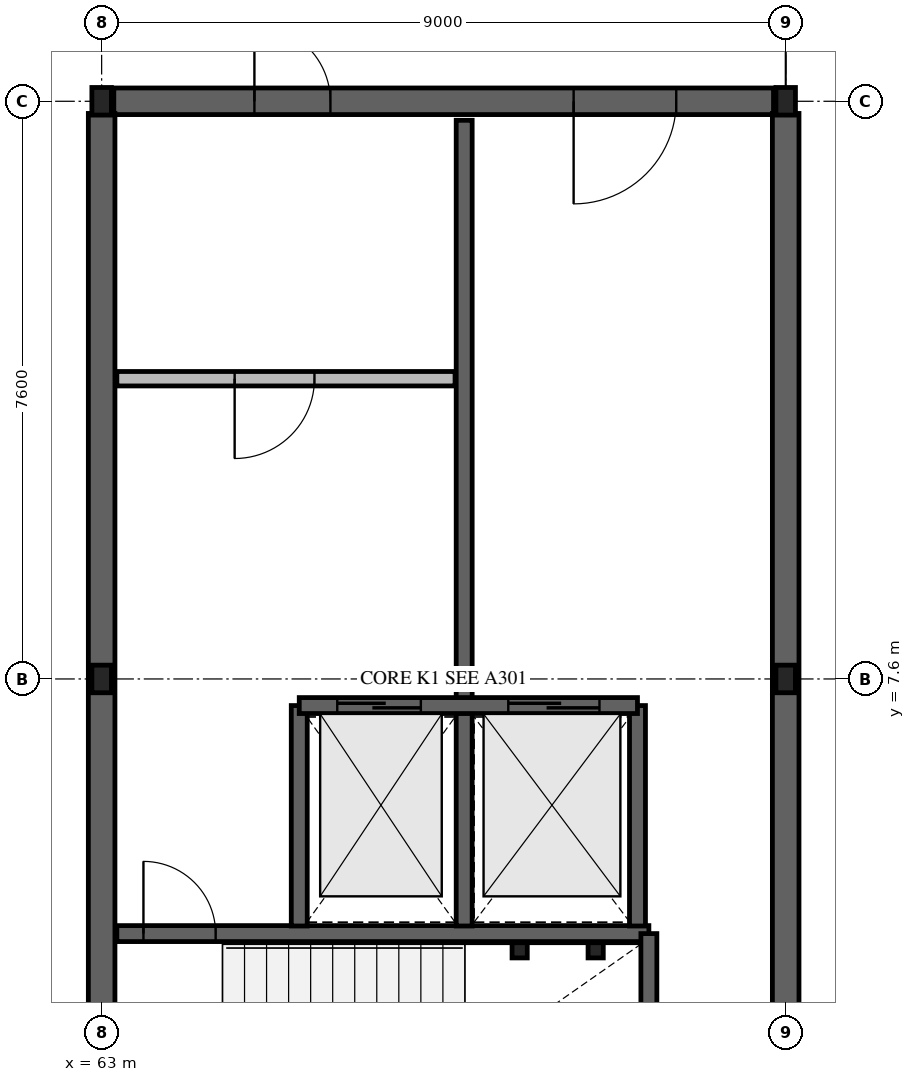
"""IFC4 building model, lengths in metres.
Left out: names, types, materials, properties, quantities, classifications, styles, units other than length and angle.
Written with IfcOpenShell. Run it as: python <this file> out.ifc"""

import sys

from ifc_helpers import new_model, si_unit, direction, frame, frame_2d, origin, origin_2d, place, context, subcontext, project, spatial, rectangle, hollow_rectangle, i_section, extrude, element, fill, save


model = new_model("IFC4")
c1 = context("Model", 3, precision=1e-05, world=origin(), true_north=direction((0.0, 1.0)))
c2 = subcontext(c1, "Body", "Model", "MODEL_VIEW")
j1 = project(units=[si_unit("LENGTHUNIT", "METRE"), si_unit("PLANEANGLEUNIT", "RADIAN")], contexts=[c1])
p1 = place(None, origin())
s1 = spatial("IfcSite", under=j1, at=p1, CompositionType="ELEMENT")
p2 = place(p1, origin())
s2 = spatial("IfcBuilding", under=s1, at=p2, CompositionType="ELEMENT")
p3 = place(p2, frame((0.0, 0.0, 13.68)))
s3 = spatial("IfcBuildingStorey", under=s2, at=p3, CompositionType="ELEMENT", Elevation=13.68)
for number, where, z_axis, x_axis in (
    (1, (63.0, 7.6, 0.0), (0.0, 0.0, 1.0), (1.0, 0.0, 0.0)),
    (2, (63.0, 15.2, 0.0), (0.0, 0.0, 1.0), (1.0, 0.0, 0.0)),
    (3, (72.0, 7.6, 0.0), (0.0, 0.0, 1.0), (1.0, 0.0, 0.0)),
    (4, (72.0, 15.2, 0.0), (0.0, 0.0, 1.0), (1.0, 0.0, 0.0)),
):
    element("IfcColumn", number, at=place(p3, frame(where, z_axis=z_axis, x_axis=x_axis)), inside=s3, PredefinedType="COLUMN", context=c2, shape_type="SweptSolid", body=[
        extrude(i_section(OverallWidth=0.257, OverallDepth=0.363, WebThickness=0.013, FlangeThickness=0.022, FilletRadius=0.015, at=origin_2d()), origin(), (0.0, 0.0, 1.0), 4.32),
    ])
p4 = place(p3, frame((63.16, 15.2, 0.0), z_axis=(0.0, 0.0, 1.0), x_axis=(1.0, 0.0, 0.0)))
e5 = element("IfcWall", 5, at=p4, inside=s3, PredefinedType="SHEAR", context=c2, shape_type="SweptSolid", body=[
    extrude(rectangle(XDim=8.68, YDim=0.35, at=frame_2d((4.34, 0.0))), origin(), (0.0, 0.0, 1.0), 4.04),
])
p5 = place(p4, frame((1.85, 0.0, 0.0)))
e6 = element("IfcOpeningElement", 6, at=p5, cuts=e5, PredefinedType="OPENING", context=c2, shape_type="SweptSolid", body=[
    extrude(rectangle(XDim=1.0, YDim=2.15, at=frame_2d((0.5, 1.075))), frame((0.0, 0.185, 0.0), z_axis=(0.0, -1.0, 0.0), x_axis=(1.0, 0.0, 0.0)), (0.0, 0.0, 1.0), 0.37),
])
p6 = place(p4, frame((6.05, 0.0, 0.0)))
e7 = element("IfcOpeningElement", 7, at=p6, cuts=e5, PredefinedType="OPENING", context=c2, shape_type="SweptSolid", body=[
    extrude(rectangle(XDim=1.35, YDim=2.18, at=frame_2d((0.675, 1.09))), frame((0.0, 0.185, 0.0), z_axis=(0.0, -1.0, 0.0), x_axis=(1.0, 0.0, 0.0)), (0.0, 0.0, 1.0), 0.37),
])
for number, where, z_axis, x_axis in (
    (8, (63.0, 0.16, 0.0), (0.0, 0.0, 1.0), (0.0, 1.0, 0.0)),
    (9, (72.0, 0.16, 0.0), (0.0, 0.0, 1.0), (0.0, 1.0, 0.0)),
):
    element("IfcWall", number, at=place(p3, frame(where, z_axis=z_axis, x_axis=x_axis)), inside=s3, PredefinedType="SHEAR", context=c2, shape_type="SweptSolid", body=[
        extrude(rectangle(XDim=14.88, YDim=0.35, at=frame_2d((7.44, 0.0))), origin(), (0.0, 0.0, 1.0), 4.04),
    ])
p7 = place(p3, frame((63.2, 4.25, 0.0), z_axis=(0.0, 0.0, 1.0), x_axis=(1.0, 0.0, 0.0)))
e10 = element("IfcWall", 10, at=p7, inside=s3, PredefinedType="SOLIDWALL", context=c2, shape_type="SweptSolid", body=[
    extrude(rectangle(XDim=7.0, YDim=0.21, at=frame_2d((3.5, 0.0))), origin(), (0.0, 0.0, 1.0), 4.04),
])
p8 = place(p7, frame((0.35, 0.0, 0.0)))
e11 = element("IfcOpeningElement", 11, at=p8, cuts=e10, PredefinedType="OPENING", context=c2, shape_type="SweptSolid", body=[
    extrude(rectangle(XDim=0.95, YDim=2.12, at=frame_2d((0.475, 1.06))), frame((0.0, 0.115, 0.0), z_axis=(0.0, -1.0, 0.0), x_axis=(1.0, 0.0, 0.0)), (0.0, 0.0, 1.0), 0.23),
])
p9 = place(p3, frame((70.2, 0.2, 0.0), z_axis=(0.0, 0.0, 1.0), x_axis=(0.0, 1.0, 0.0)))
e12 = element("IfcWall", 12, at=p9, inside=s3, PredefinedType="SOLIDWALL", context=c2, shape_type="SweptSolid", body=[
    extrude(rectangle(XDim=4.05, YDim=0.21, at=frame_2d((2.025, 0.0))), origin(), (0.0, 0.0, 1.0), 4.04),
])
p10 = place(p3, frame((65.6, 4.35, 0.0), z_axis=(0.0, 0.0, 1.0), x_axis=(0.0, 1.0, 0.0)))
e13 = element("IfcWall", 13, at=p10, inside=s3, PredefinedType="SOLIDWALL", context=c2, shape_type="SweptSolid", body=[
    extrude(rectangle(XDim=2.9, YDim=0.21, at=frame_2d((1.45, 0.0))), origin(), (0.0, 0.0, 1.0), 4.04),
])
p11 = place(p3, frame((67.77, 4.35, 0.0), z_axis=(0.0, 0.0, 1.0), x_axis=(0.0, 1.0, 0.0)))
e14 = element("IfcWall", 14, at=p11, inside=s3, PredefinedType="SOLIDWALL", context=c2, shape_type="SweptSolid", body=[
    extrude(rectangle(XDim=10.6, YDim=0.21, at=frame_2d((5.3, 0.0))), origin(), (0.0, 0.0, 1.0), 4.04),
])
p12 = place(p3, frame((70.05, 4.35, 0.0), z_axis=(0.0, 0.0, 1.0), x_axis=(0.0, 1.0, 0.0)))
e15 = element("IfcWall", 15, at=p12, inside=s3, PredefinedType="SOLIDWALL", context=c2, shape_type="SweptSolid", body=[
    extrude(rectangle(XDim=2.9, YDim=0.21, at=frame_2d((1.45, 0.0))), origin(), (0.0, 0.0, 1.0), 4.04),
])
p13 = place(p3, frame((65.6, 7.25, 0.0), z_axis=(0.0, 0.0, 1.0), x_axis=(1.0, 0.0, 0.0)))
e16 = element("IfcWall", 16, at=p13, inside=s3, PredefinedType="SOLIDWALL", context=c2, shape_type="SweptSolid", body=[
    extrude(rectangle(XDim=4.45, YDim=0.21, at=frame_2d((2.225, 0.0))), origin(), (0.0, 0.0, 1.0), 4.04),
])
p14 = place(p13, frame((0.5, 0.0, 0.0)))
e17 = element("IfcOpeningElement", 17, at=p14, cuts=e16, PredefinedType="OPENING", context=c2, shape_type="SweptSolid", body=[
    extrude(rectangle(XDim=1.1, YDim=2.14, at=frame_2d((0.55, 1.07))), frame((0.0, 0.115, 0.0), z_axis=(0.0, -1.0, 0.0), x_axis=(1.0, 0.0, 0.0)), (0.0, 0.0, 1.0), 0.23),
])
p15 = place(p13, frame((2.75, 0.0, 0.0)))
e18 = element("IfcOpeningElement", 18, at=p15, cuts=e16, PredefinedType="OPENING", context=c2, shape_type="SweptSolid", body=[
    extrude(rectangle(XDim=1.2, YDim=2.18, at=frame_2d((0.6, 1.09))), frame((0.0, 0.115, 0.0), z_axis=(0.0, -1.0, 0.0), x_axis=(1.0, 0.0, 0.0)), (0.0, 0.0, 1.0), 0.23),
])
p16 = place(p3, frame((63.2, 11.55, 0.0), z_axis=(0.0, 0.0, 1.0), x_axis=(1.0, 0.0, 0.0)))
e19 = element("IfcWall", 19, at=p16, inside=s3, PredefinedType="SOLIDWALL", context=c2, shape_type="SweptSolid", body=[
    extrude(rectangle(XDim=4.45, YDim=0.19, at=frame_2d((2.225, 0.0))), origin(), (0.0, 0.0, 1.0), 4.04),
])
p17 = place(p16, frame((1.55, 0.0, 0.0)))
e20 = element("IfcOpeningElement", 20, at=p17, cuts=e19, PredefinedType="OPENING", context=c2, shape_type="SweptSolid", body=[
    extrude(rectangle(XDim=1.05, YDim=2.12, at=frame_2d((0.525, 1.06))), frame((0.0, 0.105, 0.0), z_axis=(0.0, -1.0, 0.0), x_axis=(1.0, 0.0, 0.0)), (0.0, 0.0, 1.0), 0.21),
])
for number, where, z_axis, x_axis in (
    (21, (68.5, 4.03, 0.0), (0.0, 0.0, 1.0), (1.0, 0.0, 0.0)),
    (22, (69.5, 4.03, 0.0), (0.0, 0.0, 1.0), (1.0, 0.0, 0.0)),
):
    element("IfcColumn", number, at=place(p3, frame(where, z_axis=z_axis, x_axis=x_axis)), inside=s3, PredefinedType="COLUMN", context=c2, shape_type="SweptSolid", body=[
        extrude(hollow_rectangle(XDim=0.2, YDim=0.2, WallThickness=0.012, at=origin_2d()), origin(), (0.0, 0.0, 1.0), 4.32),
    ])
p18 = place(p8, origin())
e23 = element("IfcDoor", 23, at=p18, inside=s3, OperationType="SINGLE_SWING_LEFT", PredefinedType="DOOR", context=c2, shape_type="SweptSolid", body=[
    extrude(rectangle(XDim=0.95, YDim=2.12, at=frame_2d((0.475, 1.06))), frame((0.0, 0.025, 0.0), z_axis=(0.0, -1.0, 0.0), x_axis=(1.0, 0.0, 0.0)), (0.0, 0.0, 1.0), 0.05),
])
fill(e11, e23)
p19 = place(p14, origin())
e24 = element("IfcDoor", 24, at=p19, inside=s3, OperationType="SLIDING_TO_LEFT", PredefinedType="DOOR", context=c2, shape_type="SweptSolid", body=[
    extrude(rectangle(XDim=1.1, YDim=2.14, at=frame_2d((0.55, 1.07))), frame((0.0, 0.025, 0.0), z_axis=(0.0, -1.0, 0.0), x_axis=(1.0, 0.0, 0.0)), (0.0, 0.0, 1.0), 0.05),
])
fill(e17, e24)
p20 = place(p15, origin())
e25 = element("IfcDoor", 25, at=p20, inside=s3, OperationType="SLIDING_TO_LEFT", PredefinedType="DOOR", context=c2, shape_type="SweptSolid", body=[
    extrude(rectangle(XDim=1.2, YDim=2.18, at=frame_2d((0.6, 1.09))), frame((0.0, 0.025, 0.0), z_axis=(0.0, -1.0, 0.0), x_axis=(1.0, 0.0, 0.0)), (0.0, 0.0, 1.0), 0.05),
])
fill(e18, e25)
p21 = place(p17, origin())
e26 = element("IfcDoor", 26, at=p21, inside=s3, OperationType="SINGLE_SWING_RIGHT", PredefinedType="DOOR", context=c2, shape_type="SweptSolid", body=[
    extrude(rectangle(XDim=1.05, YDim=2.12, at=frame_2d((0.525, 1.06))), frame((0.0, 0.025, 0.0), z_axis=(0.0, -1.0, 0.0), x_axis=(1.0, 0.0, 0.0)), (0.0, 0.0, 1.0), 0.05),
])
fill(e20, e26)
p22 = place(p5, origin())
e27 = element("IfcDoor", 27, at=p22, inside=s3, OperationType="SINGLE_SWING_LEFT", PredefinedType="DOOR", context=c2, shape_type="SweptSolid", body=[
    extrude(rectangle(XDim=1.0, YDim=2.15, at=frame_2d((0.5, 1.075))), frame((0.0, 0.025, 0.0), z_axis=(0.0, -1.0, 0.0), x_axis=(1.0, 0.0, 0.0)), (0.0, 0.0, 1.0), 0.05),
])
fill(e6, e27)
p23 = place(p6, origin())
e28 = element("IfcDoor", 28, at=p23, inside=s3, OperationType="SINGLE_SWING_RIGHT", PredefinedType="DOOR", context=c2, shape_type="SweptSolid", body=[
    extrude(rectangle(XDim=1.35, YDim=2.18, at=frame_2d((0.675, 1.09))), frame((0.0, 0.025, 0.0), z_axis=(0.0, -1.0, 0.0), x_axis=(1.0, 0.0, 0.0)), (0.0, 0.0, 1.0), 0.05),
])
fill(e7, e28)
save(model, sys.argv[1])
